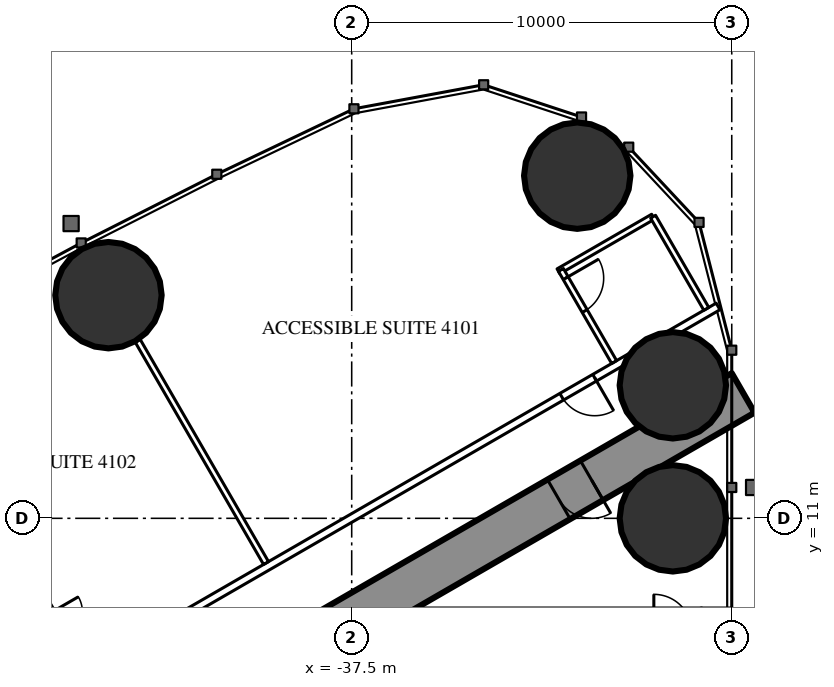
"""IFC4 building model, lengths in metres.
Left out: names, types, materials, properties, quantities, classifications, styles, units other than length and angle.
Written with IfcOpenShell. Run it as: python <this file> out.ifc"""

import sys

from ifc_helpers import new_model, si_unit, direction, frame, frame_2d, origin, origin_2d, place, context, subcontext, project, spatial, rectangle, circle, extrude, element, fill, save


model = new_model("IFC4")
c1 = context("Model", 3, precision=1e-05, world=origin(), true_north=direction((0.0, 1.0)))
c2 = subcontext(c1, "Body", "Model", "MODEL_VIEW")
j1 = project(units=[si_unit("LENGTHUNIT", "METRE"), si_unit("PLANEANGLEUNIT", "RADIAN")], contexts=[c1])
p1 = place(None, origin())
s1 = spatial("IfcSite", under=j1, at=p1, CompositionType="ELEMENT")
p2 = place(p1, origin())
s2 = spatial("IfcBuilding", under=s1, at=p2, CompositionType="ELEMENT")
p3 = place(p2, frame((0.0, 0.0, 156.3)))
s3 = spatial("IfcBuildingStorey", under=s2, at=p3, CompositionType="ELEMENT", Elevation=156.3)
for number, where, z_axis, x_axis in (
    (1, (-31.565, 20.016, 0.0), (0.0, 0.0, 1.0), (1.0, 0.0, 0.0)),
    (2, (-29.05, 11.0, 0.0), (0.0, 0.0, 1.0), (1.0, 0.0, 0.0)),
    (3, (-29.05, 14.5, 0.0), (0.0, 0.0, 1.0), (1.0, 0.0, 0.0)),
    (4, (-43.9, 16.871, 0.0), (0.0, 0.0, 1.0), (1.0, 0.0, 0.0)),
):
    element("IfcColumn", number, at=place(p3, frame(where, z_axis=z_axis, x_axis=x_axis)), inside=s3, PredefinedType="COLUMN", context=c2, shape_type="SweptSolid", body=[
        extrude(circle(Radius=1.4, at=origin_2d()), origin(), (0.0, 0.0, 1.0), 3.5),
    ])
p4 = place(p3, frame((-27.2, 14.3, 0.0), z_axis=(0.0, 0.0, 1.0), x_axis=(-0.866026593062, -0.499997940104, 0.0)))
e5 = element("IfcWall", 5, at=p4, inside=s3, PredefinedType="SHEAR", context=c2, shape_type="SweptSolid", body=[
    extrude(rectangle(XDim=28.946, YDim=1.2, at=frame_2d((14.473, 0.0))), origin(), (0.0, 0.0, 1.0), 3.5),
])
p5 = place(p4, frame((4.6, 0.0, 0.0)))
e6 = element("IfcOpeningElement", 6, at=p5, cuts=e5, PredefinedType="OPENING", context=c2, shape_type="SweptSolid", body=[
    extrude(rectangle(XDim=1.0, YDim=2.2, at=frame_2d((0.5, 1.1))), frame((0.0, 0.61, 0.0), z_axis=(0.0, -1.0, 0.0), x_axis=(1.0, 0.0, 0.0)), (0.0, 0.0, 1.0), 1.22),
])
p6 = place(p4, frame((13.395, 0.0, 0.0)))
e7 = element("IfcOpeningElement", 7, at=p6, cuts=e5, PredefinedType="OPENING", context=c2, shape_type="SweptSolid", body=[
    extrude(rectangle(XDim=1.8, YDim=2.2, at=frame_2d((0.9, 1.1))), frame((0.0, 0.61, 0.0), z_axis=(0.0, -1.0, 0.0), x_axis=(1.0, 0.0, 0.0)), (0.0, 0.0, 1.0), 1.22),
])
p7 = place(p3, frame((-27.86, 16.575, 0.0), z_axis=(0.0, 0.0, 1.0), x_axis=(-0.866025533911, -0.499999774615, 0.0)))
e8 = element("IfcWall", 8, at=p7, inside=s3, PredefinedType="PARTITIONING", context=c2, shape_type="SweptSolid", body=[
    extrude(rectangle(XDim=33.149, YDim=0.2, at=frame_2d((16.575, 0.0))), origin(), (0.0, 0.0, 1.0), 3.25),
])
p8 = place(p7, frame((3.75, 0.0, 0.0)))
e9 = element("IfcOpeningElement", 9, at=p8, cuts=e8, PredefinedType="OPENING", context=c2, shape_type="SweptSolid", body=[
    extrude(rectangle(XDim=1.0, YDim=2.2, at=frame_2d((0.5, 1.1))), frame((0.0, 0.11, 0.0), z_axis=(0.0, -1.0, 0.0), x_axis=(1.0, 0.0, 0.0)), (0.0, 0.0, 1.0), 0.22),
])
p9 = place(p7, frame((17.997, 0.0, 0.0)))
e10 = element("IfcOpeningElement", 10, at=p9, cuts=e8, PredefinedType="OPENING", context=c2, shape_type="SweptSolid", body=[
    extrude(rectangle(XDim=0.95, YDim=2.2, at=frame_2d((0.475, 1.1))), frame((0.0, 0.11, 0.0), z_axis=(0.0, -1.0, 0.0), x_axis=(1.0, 0.0, 0.0)), (0.0, 0.0, 1.0), 0.22),
])
p10 = place(p7, frame((22.047, 0.0, 0.0)))
e11 = element("IfcOpeningElement", 11, at=p10, cuts=e8, PredefinedType="OPENING", context=c2, shape_type="SweptSolid", body=[
    extrude(rectangle(XDim=0.95, YDim=2.2, at=frame_2d((0.475, 1.1))), frame((0.0, 0.11, 0.0), z_axis=(0.0, -1.0, 0.0), x_axis=(1.0, 0.0, 0.0)), (0.0, 0.0, 1.0), 0.22),
])
p11 = place(p7, frame((30.042, 0.0, 0.0)))
e12 = element("IfcOpeningElement", 12, at=p11, cuts=e8, PredefinedType="OPENING", context=c2, shape_type="SweptSolid", body=[
    extrude(rectangle(XDim=0.95, YDim=2.2, at=frame_2d((0.475, 1.1))), frame((0.0, 0.11, 0.0), z_axis=(0.0, -1.0, 0.0), x_axis=(1.0, 0.0, 0.0)), (0.0, 0.0, 1.0), 0.22),
])
p12 = place(p3, frame((-39.754, 9.823, 0.0), z_axis=(0.0, 0.0, 1.0), x_axis=(-0.499997670926, 0.866026748472, 0.0)))
e13 = element("IfcWall", 13, at=p12, inside=s3, PredefinedType="PARTITIONING", context=c2, shape_type="SweptSolid", body=[
    extrude(rectangle(XDim=6.757, YDim=0.15, at=frame_2d((3.379, 0.0))), origin(), (0.0, 0.0, 1.0), 2.3),
])
p13 = place(p3, frame((-29.57, 18.936, 0.0), z_axis=(0.0, 0.0, 1.0), x_axis=(-0.866018712932, -0.500011588718, 0.0)))
e14 = element("IfcWall", 14, at=p13, inside=s3, PredefinedType="PARTITIONING", context=c2, shape_type="SweptSolid", body=[
    extrude(rectangle(XDim=2.875, YDim=0.15, at=frame_2d((1.438, 0.0))), origin(), (0.0, 0.0, 1.0), 3.25),
])
p14 = place(p3, frame((-30.595, 15.111, 0.0), z_axis=(0.0, 0.0, 1.0), x_axis=(-0.49998411664, 0.866034573852, 0.0)))
e15 = element("IfcWall", 15, at=p14, inside=s3, PredefinedType="PARTITIONING", context=c2, shape_type="SweptSolid", body=[
    extrude(rectangle(XDim=2.8, YDim=0.15, at=frame_2d((1.4, 0.0))), origin(), (0.0, 0.0, 1.0), 3.25),
])
p15 = place(p14, frame((1.55, 0.0, 0.0)))
e16 = element("IfcOpeningElement", 16, at=p15, cuts=e15, PredefinedType="OPENING", context=c2, shape_type="SweptSolid", body=[
    extrude(rectangle(XDim=1.0, YDim=2.2, at=frame_2d((0.5, 1.1))), frame((0.0, 0.085, 0.0), z_axis=(0.0, -1.0, 0.0), x_axis=(1.0, 0.0, 0.0)), (0.0, 0.0, 1.0), 0.17),
])
p16 = place(p3, frame((-28.17, 16.511, 0.0), z_axis=(0.0, 0.0, 1.0), x_axis=(-0.49994636267, 0.866056369097, 0.0)))
e17 = element("IfcWall", 17, at=p16, inside=s3, PredefinedType="PARTITIONING", context=c2, shape_type="SweptSolid", body=[
    extrude(rectangle(XDim=2.8, YDim=0.15, at=frame_2d((1.4, 0.0))), origin(), (0.0, 0.0, 1.0), 3.25),
])
p17 = place(p3, frame((-44.535, 7.063, 0.0), z_axis=(0.0, 0.0, 1.0), x_axis=(-0.500047596559, 0.865997922154, 0.0)))
e18 = element("IfcWall", 18, at=p17, inside=s3, PredefinedType="PARTITIONING", context=c2, shape_type="SweptSolid", body=[
    extrude(rectangle(XDim=2.6, YDim=0.15, at=frame_2d((1.3, 0.0))), origin(), (0.0, 0.0, 1.0), 3.25),
])
p18 = place(p17, frame((0.9, 0.0, 0.0)))
e19 = element("IfcOpeningElement", 19, at=p18, cuts=e18, PredefinedType="OPENING", context=c2, shape_type="SweptSolid", body=[
    extrude(rectangle(XDim=0.8, YDim=2.2, at=frame_2d((0.4, 1.1))), frame((0.0, 0.085, 0.0), z_axis=(0.0, -1.0, 0.0), x_axis=(1.0, 0.0, 0.0)), (0.0, 0.0, 1.0), 0.17),
])
p19 = place(p15, origin())
e20 = element("IfcDoor", 20, at=p19, inside=s3, OperationType="SINGLE_SWING_RIGHT", PredefinedType="DOOR", context=c2, shape_type="SweptSolid", body=[
    extrude(rectangle(XDim=1.0, YDim=2.2, at=frame_2d((0.5, 1.1))), frame((0.0, 0.025, 0.0), z_axis=(0.0, -1.0, 0.0), x_axis=(1.0, 0.0, 0.0)), (0.0, 0.0, 1.0), 0.05),
])
fill(e16, e20)
p20 = place(p8, origin())
e21 = element("IfcDoor", 21, at=p20, inside=s3, OperationType="SINGLE_SWING_LEFT", PredefinedType="DOOR", context=c2, shape_type="SweptSolid", body=[
    extrude(rectangle(XDim=1.0, YDim=2.2, at=frame_2d((0.5, 1.1))), frame((0.0, 0.025, 0.0), z_axis=(0.0, -1.0, 0.0), x_axis=(1.0, 0.0, 0.0)), (0.0, 0.0, 1.0), 0.05),
])
fill(e9, e21)
p21 = place(p5, origin())
e22 = element("IfcDoor", 22, at=p21, inside=s3, OperationType="SINGLE_SWING_LEFT", PredefinedType="DOOR", context=c2, shape_type="SweptSolid", body=[
    extrude(rectangle(XDim=1.0, YDim=2.2, at=frame_2d((0.5, 1.1))), frame((0.0, 0.025, 0.0), z_axis=(0.0, -1.0, 0.0), x_axis=(1.0, 0.0, 0.0)), (0.0, 0.0, 1.0), 0.05),
])
fill(e6, e22)
save(model, sys.argv[1])
